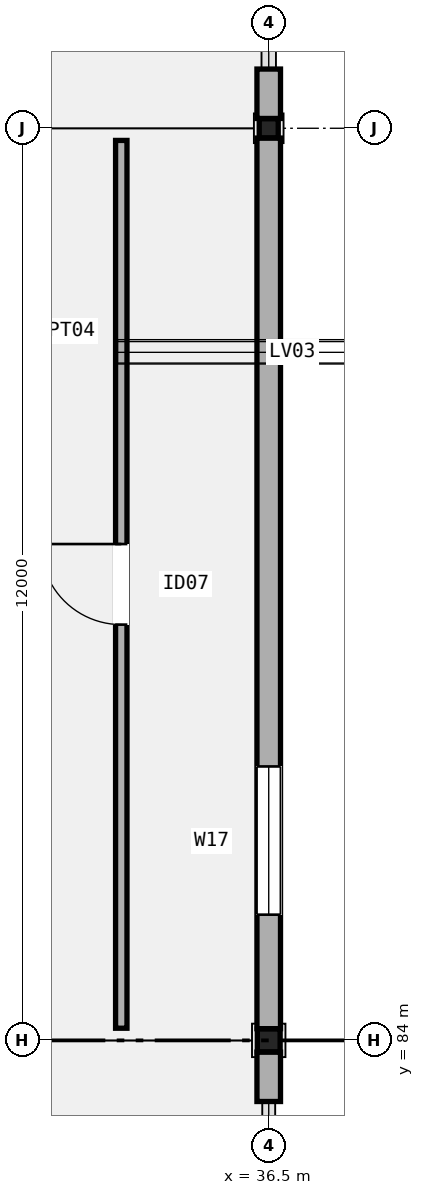
"""IFC4 building model, lengths in metres.
Left out: names, types, materials, properties, quantities, classifications, styles, units other than length and angle.
Written with IfcOpenShell. Run it as: python <this file> out.ifc"""

import sys

from ifc_helpers import new_model, si_unit, direction, frame, frame_2d, origin, origin_2d, place, context, subcontext, project, spatial, rectangle, hollow_rectangle, extrude, element, fill, save


model = new_model("IFC4")
c1 = context("Model", 3, precision=1e-05, world=origin(), true_north=direction((0.0, 1.0)))
c2 = subcontext(c1, "Body", "Model", "MODEL_VIEW")
j1 = project(units=[si_unit("LENGTHUNIT", "METRE"), si_unit("PLANEANGLEUNIT", "RADIAN")], contexts=[c1])
p1 = place(None, origin())
s1 = spatial("IfcSite", under=j1, at=p1, CompositionType="ELEMENT")
p2 = place(p1, origin())
s2 = spatial("IfcBuilding", under=s1, at=p2, CompositionType="ELEMENT")
p3 = place(p2, frame((0.0, 0.0, 20.4)))
s3 = spatial("IfcBuildingStorey", under=s2, at=p3, CompositionType="ELEMENT", Elevation=20.4)
p4 = place(p3, frame((36.5, 84.0, 0.0), z_axis=(0.0, 0.0, 1.0), x_axis=(1.0, 0.0, 0.0)))
e1 = element("IfcColumn", 1, at=p4, inside=s3, PredefinedType="COLUMN", context=c2, shape_type="SweptSolid", body=[
    extrude(hollow_rectangle(XDim=0.3, YDim=0.3, WallThickness=0.012, InnerFilletRadius=0.012, OuterFilletRadius=0.024, at=origin_2d()), origin(), (0.0, 0.0, 1.0), 5.4),
])
p5 = place(p3, frame((36.5, 96.0, 0.0), z_axis=(0.0, 0.0, 1.0), x_axis=(1.0, 0.0, 0.0)))
e2 = element("IfcColumn", 2, at=p5, inside=s3, PredefinedType="COLUMN", context=c2, shape_type="SweptSolid", body=[
    extrude(hollow_rectangle(XDim=0.25, YDim=0.25, WallThickness=0.012, InnerFilletRadius=0.012, OuterFilletRadius=0.024, at=origin_2d()), origin(), (0.0, 0.0, 1.0), 5.4),
])
p6 = place(p3, frame((36.5, 83.196, 0.0), z_axis=(0.0, 0.0, 1.0), x_axis=(0.0, 1.0, 0.0)))
e3 = element("IfcWall", 3, at=p6, inside=s3, PredefinedType="SOLIDWALL", context=c2, shape_type="SweptSolid", body=[
    extrude(rectangle(XDim=0.65, YDim=0.31, at=frame_2d((0.325, 0.0))), origin(), (0.0, 0.0, 1.0), 4.48),
])
p7 = place(p3, frame((36.5, 84.154, 0.0), z_axis=(0.0, 0.0, 1.0), x_axis=(0.0, 1.0, 0.0)))
e4 = element("IfcWall", 4, at=p7, inside=s3, PredefinedType="SOLIDWALL", context=c2, shape_type="SweptSolid", body=[
    extrude(rectangle(XDim=11.717, YDim=0.31, at=frame_2d((5.858, 0.0))), origin(), (0.0, 0.0, 1.0), 4.58),
])
p8 = place(p7, frame((1.5, 0.0, 0.95)))
e5 = element("IfcOpeningElement", 5, at=p8, cuts=e4, PredefinedType="OPENING", context=c2, shape_type="SweptSolid", body=[
    extrude(rectangle(XDim=1.95, YDim=2.35, at=frame_2d((0.975, 1.175))), frame((0.0, 0.165, 0.0), z_axis=(0.0, -1.0, 0.0), x_axis=(1.0, 0.0, 0.0)), (0.0, 0.0, 1.0), 0.33),
])
p9 = place(p3, frame((36.5, 96.129, 0.0), z_axis=(0.0, 0.0, 1.0), x_axis=(0.0, 1.0, 0.0)))
e6 = element("IfcWall", 6, at=p9, inside=s3, PredefinedType="SOLIDWALL", context=c2, shape_type="SweptSolid", body=[
    extrude(rectangle(XDim=0.65, YDim=0.31, at=frame_2d((0.325, 0.0))), origin(), (0.0, 0.0, 1.0), 4.592),
])
p10 = place(p3, frame((34.56, 84.16, 0.0), z_axis=(0.0, 0.0, 1.0), x_axis=(0.0, 1.0, 0.0)))
e7 = element("IfcWall", 7, at=p10, inside=s3, PredefinedType="PARTITIONING", context=c2, shape_type="SweptSolid", body=[
    extrude(rectangle(XDim=11.68, YDim=0.15, at=frame_2d((5.84, 0.0))), origin(), (0.0, 0.0, 1.0), 4.52),
])
p11 = place(p10, frame((5.31, 0.0, 0.0)))
e8 = element("IfcOpeningElement", 8, at=p11, cuts=e7, PredefinedType="OPENING", context=c2, shape_type="SweptSolid", body=[
    extrude(rectangle(XDim=1.06, YDim=2.15, at=frame_2d((0.53, 1.075))), frame((0.0, 0.085, 0.0), z_axis=(0.0, -1.0, 0.0), x_axis=(1.0, 0.0, 0.0)), (0.0, 0.0, 1.0), 0.17),
])
p12 = place(p8, origin())
e9 = element("IfcWindow", 9, at=p12, inside=s3, PartitioningType="SINGLE_PANEL", PredefinedType="WINDOW", context=c2, shape_type="SweptSolid", body=[
    extrude(rectangle(XDim=1.95, YDim=2.35, at=frame_2d((0.975, 1.175))), frame((0.0, 0.03, 0.0), z_axis=(0.0, -1.0, 0.0), x_axis=(1.0, 0.0, 0.0)), (0.0, 0.0, 1.0), 0.06),
])
fill(e5, e9)
p13 = place(p11, origin())
e10 = element("IfcDoor", 10, at=p13, inside=s3, OperationType="SINGLE_SWING_RIGHT", PredefinedType="DOOR", context=c2, shape_type="SweptSolid", body=[
    extrude(rectangle(XDim=1.06, YDim=2.15, at=frame_2d((0.53, 1.075))), frame((0.0, 0.025, 0.0), z_axis=(0.0, -1.0, 0.0), x_axis=(1.0, 0.0, 0.0)), (0.0, 0.0, 1.0), 0.05),
])
fill(e8, e10)
save(model, sys.argv[1])
